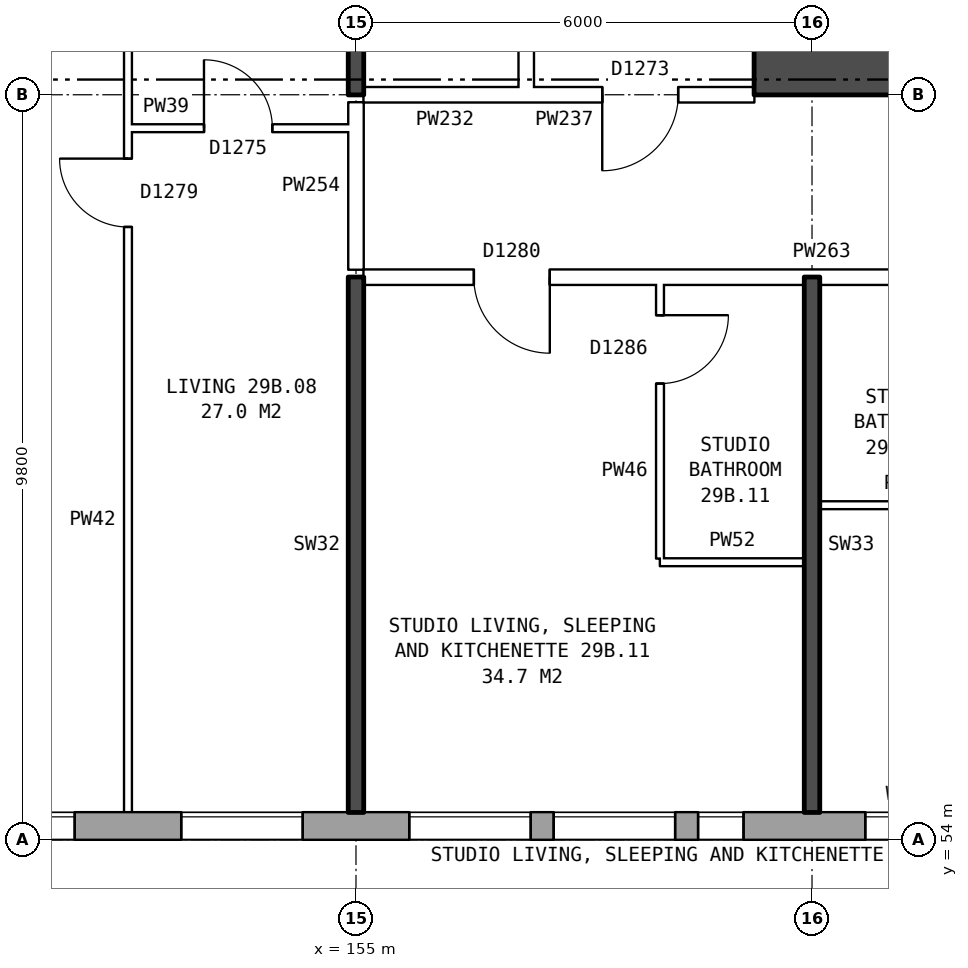
"""IFC4 building model, lengths in metres.
Left out: names, types, materials, properties, quantities, classifications, styles, units other than length and angle.
Written with IfcOpenShell. Run it as: python <this file> out.ifc"""

import sys

from ifc_helpers import new_model, si_unit, direction, frame, frame_2d, origin, place, context, subcontext, project, spatial, rectangle, extrude, element, fill, save


model = new_model("IFC4")
c1 = context("Model", 3, precision=1e-05, world=origin(), true_north=direction((0.0, 1.0)))
c2 = subcontext(c1, "Body", "Model", "MODEL_VIEW")
j1 = project(units=[si_unit("LENGTHUNIT", "METRE"), si_unit("PLANEANGLEUNIT", "RADIAN")], contexts=[c1])
p1 = place(None, origin())
s1 = spatial("IfcSite", under=j1, at=p1, CompositionType="ELEMENT")
p2 = place(p1, origin())
s2 = spatial("IfcBuilding", under=s1, at=p2, CompositionType="ELEMENT")
p3 = place(p2, frame((0.0, 0.0, 105.7)))
s3 = spatial("IfcBuildingStorey", under=s2, at=p3, CompositionType="ELEMENT", Elevation=105.7)
p4 = place(p3, frame((134.075, 54.18, 0.0), z_axis=(0.0, 0.0, 1.0), x_axis=(1.0, 0.0, 0.0)))
e1 = element("IfcWall", 1, at=p4, inside=s3, PredefinedType="STANDARD", context=c2, shape_type="SweptSolid", body=[
    extrude(rectangle(XDim=36.851, YDim=0.36, at=frame_2d((18.425, 0.0))), origin(), (0.0, 0.0, 1.0), 2.85),
])
p5 = place(p4, frame((0.625, 0.0, 0.8)))
e2 = element("IfcOpeningElement", 2, at=p5, cuts=e1, PredefinedType="OPENING", context=c2, shape_type="SweptSolid", body=[
    extrude(rectangle(XDim=1.6, YDim=1.8, at=frame_2d((0.8, 0.9))), frame((0.0, 0.19, 0.0), z_axis=(0.0, -1.0, 0.0), x_axis=(1.0, 0.0, 0.0)), (0.0, 0.0, 1.0), 0.38),
])
p6 = place(p4, frame((3.625, 0.0, 0.8)))
e3 = element("IfcOpeningElement", 3, at=p6, cuts=e1, PredefinedType="OPENING", context=c2, shape_type="SweptSolid", body=[
    extrude(rectangle(XDim=1.6, YDim=1.8, at=frame_2d((0.8, 0.9))), frame((0.0, 0.19, 0.0), z_axis=(0.0, -1.0, 0.0), x_axis=(1.0, 0.0, 0.0)), (0.0, 0.0, 1.0), 0.38),
])
p7 = place(p4, frame((6.625, 0.0, 0.8)))
e4 = element("IfcOpeningElement", 4, at=p7, cuts=e1, PredefinedType="OPENING", context=c2, shape_type="SweptSolid", body=[
    extrude(rectangle(XDim=1.6, YDim=1.8, at=frame_2d((0.8, 0.9))), frame((0.0, 0.19, 0.0), z_axis=(0.0, -1.0, 0.0), x_axis=(1.0, 0.0, 0.0)), (0.0, 0.0, 1.0), 0.38),
])
p8 = place(p4, frame((9.925, 0.0, 0.15)))
e5 = element("IfcOpeningElement", 5, at=p8, cuts=e1, PredefinedType="OPENING", context=c2, shape_type="SweptSolid", body=[
    extrude(rectangle(XDim=0.6, YDim=0.9, at=frame_2d((0.3, 0.45))), frame((0.0, 0.19, 0.0), z_axis=(0.0, -1.0, 0.0), x_axis=(1.0, 0.0, 0.0)), (0.0, 0.0, 1.0), 0.38),
])
p9 = place(p4, frame((12.625, 0.0, 0.8)))
e6 = element("IfcOpeningElement", 6, at=p9, cuts=e1, PredefinedType="OPENING", context=c2, shape_type="SweptSolid", body=[
    extrude(rectangle(XDim=1.6, YDim=1.8, at=frame_2d((0.8, 0.9))), frame((0.0, 0.19, 0.0), z_axis=(0.0, -1.0, 0.0), x_axis=(1.0, 0.0, 0.0)), (0.0, 0.0, 1.0), 0.38),
])
p10 = place(p4, frame((15.625, 0.0, 0.8)))
e7 = element("IfcOpeningElement", 7, at=p10, cuts=e1, PredefinedType="OPENING", context=c2, shape_type="SweptSolid", body=[
    extrude(rectangle(XDim=1.6, YDim=1.8, at=frame_2d((0.8, 0.9))), frame((0.0, 0.19, 0.0), z_axis=(0.0, -1.0, 0.0), x_axis=(1.0, 0.0, 0.0)), (0.0, 0.0, 1.0), 0.38),
])
p11 = place(p4, frame((18.625, 0.0, 0.8)))
e8 = element("IfcOpeningElement", 8, at=p11, cuts=e1, PredefinedType="OPENING", context=c2, shape_type="SweptSolid", body=[
    extrude(rectangle(XDim=1.6, YDim=1.8, at=frame_2d((0.8, 0.9))), frame((0.0, 0.19, 0.0), z_axis=(0.0, -1.0, 0.0), x_axis=(1.0, 0.0, 0.0)), (0.0, 0.0, 1.0), 0.38),
])
p12 = place(p4, frame((21.625, 0.0, 0.8)))
e9 = element("IfcOpeningElement", 9, at=p12, cuts=e1, PredefinedType="OPENING", context=c2, shape_type="SweptSolid", body=[
    extrude(rectangle(XDim=1.6, YDim=1.8, at=frame_2d((0.8, 0.9))), frame((0.0, 0.19, 0.0), z_axis=(0.0, -1.0, 0.0), x_axis=(1.0, 0.0, 0.0)), (0.0, 0.0, 1.0), 0.38),
])
p13 = place(p4, frame((23.525, 0.0, 0.8)))
e10 = element("IfcOpeningElement", 10, at=p13, cuts=e1, PredefinedType="OPENING", context=c2, shape_type="SweptSolid", body=[
    extrude(rectangle(XDim=1.6, YDim=1.8, at=frame_2d((0.8, 0.9))), frame((0.0, 0.19, 0.0), z_axis=(0.0, -1.0, 0.0), x_axis=(1.0, 0.0, 0.0)), (0.0, 0.0, 1.0), 0.38),
])
p14 = place(p4, frame((27.625, 0.0, 1.4)))
e11 = element("IfcOpeningElement", 11, at=p14, cuts=e1, PredefinedType="OPENING", context=c2, shape_type="SweptSolid", body=[
    extrude(rectangle(XDim=1.0, YDim=1.2, at=frame_2d((0.5, 0.6))), frame((0.0, 0.19, 0.0), z_axis=(0.0, -1.0, 0.0), x_axis=(1.0, 0.0, 0.0)), (0.0, 0.0, 1.0), 0.38),
])
p15 = place(p4, frame((30.625, 0.0, 0.8)))
e12 = element("IfcOpeningElement", 12, at=p15, cuts=e1, PredefinedType="OPENING", context=c2, shape_type="SweptSolid", body=[
    extrude(rectangle(XDim=1.6, YDim=1.8, at=frame_2d((0.8, 0.9))), frame((0.0, 0.19, 0.0), z_axis=(0.0, -1.0, 0.0), x_axis=(1.0, 0.0, 0.0)), (0.0, 0.0, 1.0), 0.38),
])
p16 = place(p4, frame((33.625, 0.0, 0.8)))
e13 = element("IfcOpeningElement", 13, at=p16, cuts=e1, PredefinedType="OPENING", context=c2, shape_type="SweptSolid", body=[
    extrude(rectangle(XDim=1.6, YDim=1.8, at=frame_2d((0.8, 0.9))), frame((0.0, 0.19, 0.0), z_axis=(0.0, -1.0, 0.0), x_axis=(1.0, 0.0, 0.0)), (0.0, 0.0, 1.0), 0.38),
])
p17 = place(p4, frame((10.975, 0.0, 0.15)))
e14 = element("IfcOpeningElement", 14, at=p17, cuts=e1, PredefinedType="OPENING", context=c2, shape_type="SweptSolid", body=[
    extrude(rectangle(XDim=0.8, YDim=1.8, at=frame_2d((0.4, 0.9))), frame((0.0, 0.19, 0.0), z_axis=(0.0, -1.0, 0.0), x_axis=(1.0, 0.0, 0.0)), (0.0, 0.0, 1.0), 0.38),
])
p18 = place(p4, frame((25.425, 0.0, 0.8)))
e15 = element("IfcOpeningElement", 15, at=p18, cuts=e1, PredefinedType="OPENING", context=c2, shape_type="SweptSolid", body=[
    extrude(rectangle(XDim=0.6, YDim=0.9, at=frame_2d((0.3, 0.45))), frame((0.0, 0.19, 0.0), z_axis=(0.0, -1.0, 0.0), x_axis=(1.0, 0.0, 0.0)), (0.0, 0.0, 1.0), 0.38),
])
p19 = place(p4, frame((28.925, 0.0, 0.8)))
e16 = element("IfcOpeningElement", 16, at=p19, cuts=e1, PredefinedType="OPENING", context=c2, shape_type="SweptSolid", body=[
    extrude(rectangle(XDim=1.4, YDim=1.8, at=frame_2d((0.7, 0.9))), frame((0.0, 0.19, 0.0), z_axis=(0.0, -1.0, 0.0), x_axis=(1.0, 0.0, 0.0)), (0.0, 0.0, 1.0), 0.38),
])
p20 = place(p3, frame((160.24, 64.125, 0.0), z_axis=(0.0, 0.0, 1.0), x_axis=(1.0, 0.0, 0.0)))
e17 = element("IfcWall", 17, at=p20, inside=s3, PredefinedType="SHEAR", context=c2, shape_type="SweptSolid", body=[
    extrude(rectangle(XDim=8.4, YDim=0.65, at=frame_2d((4.2, 0.0))), origin(), (0.0, 0.0, 1.0), 2.85),
])
p21 = place(p3, frame((157.24, 63.9, 0.0), z_axis=(0.0, 0.0, 1.0), x_axis=(0.0, 1.0, 0.0)))
e18 = element("IfcWall", 18, at=p21, inside=s3, PredefinedType="PARTITIONING", context=c2, shape_type="SweptSolid", body=[
    extrude(rectangle(XDim=12.2, YDim=0.2, at=frame_2d((6.1, 0.0))), origin(), (0.0, 0.0, 1.0), 2.85),
])
p22 = place(p21, frame((5.1, 0.0, 0.0)))
e19 = element("IfcOpeningElement", 19, at=p22, cuts=e18, PredefinedType="OPENING", context=c2, shape_type="SweptSolid", body=[
    extrude(rectangle(XDim=2.0, YDim=2.1, at=frame_2d((1.0, 1.05))), frame((0.0, 0.11, 0.0), z_axis=(0.0, -1.0, 0.0), x_axis=(1.0, 0.0, 0.0)), (0.0, 0.0, 1.0), 0.22),
])
p23 = place(p3, frame((159.0, 57.65, 0.0), z_axis=(0.0, 0.0, 1.0), x_axis=(1.0, 0.0, 0.0)))
e20 = element("IfcWall", 20, at=p23, inside=s3, PredefinedType="PARTITIONING", context=c2, shape_type="SweptSolid", body=[
    extrude(rectangle(XDim=1.9, YDim=0.1, at=frame_2d((0.95, 0.0))), origin(), (0.0, 0.0, 1.0), 2.85),
])
p24 = place(p3, frame((161.1, 58.4, 0.0), z_axis=(0.0, 0.0, 1.0), x_axis=(1.0, 0.0, 0.0)))
e21 = element("IfcWall", 21, at=p24, inside=s3, PredefinedType="PARTITIONING", context=c2, shape_type="SweptSolid", body=[
    extrude(rectangle(XDim=2.3, YDim=0.1, at=frame_2d((1.15, 0.0))), origin(), (0.0, 0.0, 1.0), 2.85),
])
p25 = place(p3, frame((155.1, 61.4, 0.0), z_axis=(0.0, 0.0, 1.0), x_axis=(1.0, 0.0, 0.0)))
e22 = element("IfcWall", 22, at=p25, inside=s3, PredefinedType="PARTITIONING", context=c2, shape_type="SweptSolid", body=[
    extrude(rectangle(XDim=18.54, YDim=0.2, at=frame_2d((9.27, 0.0))), origin(), (0.0, 0.0, 1.0), 2.85),
])
p26 = place(p25, frame((1.45, 0.0, 0.0)))
e23 = element("IfcOpeningElement", 23, at=p26, cuts=e22, PredefinedType="OPENING", context=c2, shape_type="SweptSolid", body=[
    extrude(rectangle(XDim=1.0, YDim=2.1, at=frame_2d((0.5, 1.05))), frame((0.0, 0.11, 0.0), z_axis=(0.0, -1.0, 0.0), x_axis=(1.0, 0.0, 0.0)), (0.0, 0.0, 1.0), 0.22),
])
p27 = place(p25, frame((9.6, 0.0, 0.0)))
e24 = element("IfcOpeningElement", 24, at=p27, cuts=e22, PredefinedType="OPENING", context=c2, shape_type="SweptSolid", body=[
    extrude(rectangle(XDim=1.0, YDim=2.1, at=frame_2d((0.5, 1.05))), frame((0.0, 0.11, 0.0), z_axis=(0.0, -1.0, 0.0), x_axis=(1.0, 0.0, 0.0)), (0.0, 0.0, 1.0), 0.22),
])
p28 = place(p25, frame((13.4, 0.0, 0.0)))
e25 = element("IfcOpeningElement", 25, at=p28, cuts=e22, PredefinedType="OPENING", context=c2, shape_type="SweptSolid", body=[
    extrude(rectangle(XDim=1.0, YDim=2.1, at=frame_2d((0.5, 1.05))), frame((0.0, 0.11, 0.0), z_axis=(0.0, -1.0, 0.0), x_axis=(1.0, 0.0, 0.0)), (0.0, 0.0, 1.0), 0.22),
])
p29 = place(p3, frame((152.0, 63.36, 0.0), z_axis=(0.0, 0.0, 1.0), x_axis=(1.0, 0.0, 0.0)))
e26 = element("IfcWall", 26, at=p29, inside=s3, PredefinedType="PARTITIONING", context=c2, shape_type="SweptSolid", body=[
    extrude(rectangle(XDim=2.9, YDim=0.1, at=frame_2d((1.45, 0.0))), origin(), (0.0, 0.0, 1.0), 2.85),
])
p30 = place(p29, frame((1.0, 0.0, 0.0)))
e27 = element("IfcOpeningElement", 27, at=p30, cuts=e26, PredefinedType="OPENING", context=c2, shape_type="SweptSolid", body=[
    extrude(rectangle(XDim=0.9, YDim=2.1, at=frame_2d((0.45, 1.05))), frame((0.0, 0.06, 0.0), z_axis=(0.0, -1.0, 0.0), x_axis=(1.0, 0.0, 0.0)), (0.0, 0.0, 1.0), 0.12),
])
p31 = place(p3, frame((155.1, 63.8, 0.0), z_axis=(0.0, 0.0, 1.0), x_axis=(1.0, 0.0, 0.0)))
e28 = element("IfcWall", 28, at=p31, inside=s3, PredefinedType="PARTITIONING", context=c2, shape_type="SweptSolid", body=[
    extrude(rectangle(XDim=2.14, YDim=0.2, at=frame_2d((1.07, 0.0))), origin(), (0.0, 0.0, 1.0), 2.85),
])
p32 = place(p3, frame((157.24, 63.8, 0.0), z_axis=(0.0, 0.0, 1.0), x_axis=(1.0, 0.0, 0.0)))
e29 = element("IfcWall", 29, at=p32, inside=s3, PredefinedType="PARTITIONING", context=c2, shape_type="SweptSolid", body=[
    extrude(rectangle(XDim=3.0, YDim=0.2, at=frame_2d((1.5, 0.0))), origin(), (0.0, 0.0, 1.0), 2.85),
])
p33 = place(p32, frame((1.0, 0.0, 0.0)))
e30 = element("IfcOpeningElement", 30, at=p33, cuts=e29, PredefinedType="OPENING", context=c2, shape_type="SweptSolid", body=[
    extrude(rectangle(XDim=1.0, YDim=2.1, at=frame_2d((0.5, 1.05))), frame((0.0, 0.11, 0.0), z_axis=(0.0, -1.0, 0.0), x_axis=(1.0, 0.0, 0.0)), (0.0, 0.0, 1.0), 0.22),
])
p34 = place(p3, frame((152.0, 54.36, 0.0), z_axis=(0.0, 0.0, 1.0), x_axis=(0.0, 1.0, 0.0)))
e31 = element("IfcWall", 31, at=p34, inside=s3, PredefinedType="PARTITIONING", context=c2, shape_type="SweptSolid", body=[
    extrude(rectangle(XDim=14.34, YDim=0.1, at=frame_2d((7.17, 0.0))), origin(), (0.0, 0.0, 1.0), 2.85),
])
p35 = place(p34, frame((7.7, 0.0, 0.0)))
e32 = element("IfcOpeningElement", 32, at=p35, cuts=e31, PredefinedType="OPENING", context=c2, shape_type="SweptSolid", body=[
    extrude(rectangle(XDim=0.9, YDim=2.1, at=frame_2d((0.45, 1.05))), frame((0.0, 0.06, 0.0), z_axis=(0.0, -1.0, 0.0), x_axis=(1.0, 0.0, 0.0)), (0.0, 0.0, 1.0), 0.12),
])
p36 = place(p34, frame((13.04, 0.0, 0.0)))
e33 = element("IfcOpeningElement", 33, at=p36, cuts=e31, PredefinedType="OPENING", context=c2, shape_type="SweptSolid", body=[
    extrude(rectangle(XDim=0.9, YDim=2.1, at=frame_2d((0.45, 1.05))), frame((0.0, 0.06, 0.0), z_axis=(0.0, -1.0, 0.0), x_axis=(1.0, 0.0, 0.0)), (0.0, 0.0, 1.0), 0.12),
])
p37 = place(p3, frame((155.0, 54.36, 0.0), z_axis=(0.0, 0.0, 1.0), x_axis=(0.0, 1.0, 0.0)))
e34 = element("IfcWall", 34, at=p37, inside=s3, PredefinedType="SOLIDWALL", context=c2, shape_type="SweptSolid", body=[
    extrude(rectangle(XDim=7.04, YDim=0.2, at=frame_2d((3.52, 0.0))), origin(), (0.0, 0.0, 1.0), 2.85),
])
p38 = place(p3, frame((155.0, 61.5, 0.0), z_axis=(0.0, 0.0, 1.0), x_axis=(0.0, 1.0, 0.0)))
e35 = element("IfcWall", 35, at=p38, inside=s3, PredefinedType="PARTITIONING", context=c2, shape_type="SweptSolid", body=[
    extrude(rectangle(XDim=2.2, YDim=0.2, at=frame_2d((1.1, 0.0))), origin(), (0.0, 0.0, 1.0), 2.85),
])
p39 = place(p3, frame((155.0, 63.8, 0.0), z_axis=(0.0, 0.0, 1.0), x_axis=(0.0, 1.0, 0.0)))
e36 = element("IfcWall", 36, at=p39, inside=s3, PredefinedType="SOLIDWALL", context=c2, shape_type="SweptSolid", body=[
    extrude(rectangle(XDim=5.0, YDim=0.2, at=frame_2d((2.5, 0.0))), origin(), (0.0, 0.0, 1.0), 2.85),
])
p40 = place(p3, frame((159.0, 57.7, 0.0), z_axis=(0.0, 0.0, 1.0), x_axis=(0.0, 1.0, 0.0)))
e37 = element("IfcWall", 37, at=p40, inside=s3, PredefinedType="PARTITIONING", context=c2, shape_type="SweptSolid", body=[
    extrude(rectangle(XDim=3.6, YDim=0.1, at=frame_2d((1.8, 0.0))), origin(), (0.0, 0.0, 1.0), 2.85),
])
p41 = place(p40, frame((2.3, 0.0, 0.0)))
e38 = element("IfcOpeningElement", 38, at=p41, cuts=e37, PredefinedType="OPENING", context=c2, shape_type="SweptSolid", body=[
    extrude(rectangle(XDim=0.9, YDim=2.1, at=frame_2d((0.45, 1.05))), frame((0.0, 0.06, 0.0), z_axis=(0.0, -1.0, 0.0), x_axis=(1.0, 0.0, 0.0)), (0.0, 0.0, 1.0), 0.12),
])
p42 = place(p3, frame((161.0, 54.36, 0.0), z_axis=(0.0, 0.0, 1.0), x_axis=(0.0, 1.0, 0.0)))
e39 = element("IfcWall", 39, at=p42, inside=s3, PredefinedType="SOLIDWALL", context=c2, shape_type="SweptSolid", body=[
    extrude(rectangle(XDim=7.04, YDim=0.2, at=frame_2d((3.52, 0.0))), origin(), (0.0, 0.0, 1.0), 2.85),
])
p43 = place(p10, origin())
e40 = element("IfcWindow", 40, at=p43, inside=s3, PartitioningType="SINGLE_PANEL", PredefinedType="WINDOW", context=c2, shape_type="SweptSolid", body=[
    extrude(rectangle(XDim=1.6, YDim=1.8, at=frame_2d((0.8, 0.9))), frame((0.0, 0.15, 0.0), z_axis=(0.0, -1.0, 0.0), x_axis=(1.0, 0.0, 0.0)), (0.0, 0.0, 1.0), 0.06),
])
fill(e7, e40)
p44 = place(p11, origin())
e41 = element("IfcWindow", 41, at=p44, inside=s3, PartitioningType="SINGLE_PANEL", PredefinedType="WINDOW", context=c2, shape_type="SweptSolid", body=[
    extrude(rectangle(XDim=1.6, YDim=1.8, at=frame_2d((0.8, 0.9))), frame((0.0, 0.15, 0.0), z_axis=(0.0, -1.0, 0.0), x_axis=(1.0, 0.0, 0.0)), (0.0, 0.0, 1.0), 0.06),
])
fill(e8, e41)
p45 = place(p12, origin())
e42 = element("IfcWindow", 42, at=p45, inside=s3, PartitioningType="SINGLE_PANEL", PredefinedType="WINDOW", context=c2, shape_type="SweptSolid", body=[
    extrude(rectangle(XDim=1.6, YDim=1.8, at=frame_2d((0.8, 0.9))), frame((0.0, 0.15, 0.0), z_axis=(0.0, -1.0, 0.0), x_axis=(1.0, 0.0, 0.0)), (0.0, 0.0, 1.0), 0.06),
])
fill(e9, e42)
p46 = place(p13, origin())
e43 = element("IfcWindow", 43, at=p46, inside=s3, PartitioningType="SINGLE_PANEL", PredefinedType="WINDOW", context=c2, shape_type="SweptSolid", body=[
    extrude(rectangle(XDim=1.6, YDim=1.8, at=frame_2d((0.8, 0.9))), frame((0.0, 0.15, 0.0), z_axis=(0.0, -1.0, 0.0), x_axis=(1.0, 0.0, 0.0)), (0.0, 0.0, 1.0), 0.06),
])
fill(e10, e43)
p47 = place(p14, origin())
e44 = element("IfcWindow", 44, at=p47, inside=s3, PartitioningType="SINGLE_PANEL", PredefinedType="WINDOW", context=c2, shape_type="SweptSolid", body=[
    extrude(rectangle(XDim=1.0, YDim=1.2, at=frame_2d((0.5, 0.6))), frame((0.0, 0.15, 0.0), z_axis=(0.0, -1.0, 0.0), x_axis=(1.0, 0.0, 0.0)), (0.0, 0.0, 1.0), 0.06),
])
fill(e11, e44)
p48 = place(p33, frame((1.0, 0.0, 0.0), z_axis=(0.0, 0.0, 1.0), x_axis=(-1.0, 0.0, 0.0)))
e45 = element("IfcDoor", 45, at=p48, inside=s3, OperationType="SINGLE_SWING_RIGHT", PredefinedType="DOOR", context=c2, shape_type="SweptSolid", body=[
    extrude(rectangle(XDim=1.0, YDim=2.1, at=frame_2d((0.5, 1.05))), frame((0.0, 0.025, 0.0), z_axis=(0.0, -1.0, 0.0), x_axis=(1.0, 0.0, 0.0)), (0.0, 0.0, 1.0), 0.05),
])
fill(e30, e45)
p49 = place(p35, origin())
e46 = element("IfcDoor", 46, at=p49, inside=s3, OperationType="SINGLE_SWING_RIGHT", PredefinedType="DOOR", context=c2, shape_type="SweptSolid", body=[
    extrude(rectangle(XDim=0.9, YDim=2.1, at=frame_2d((0.45, 1.05))), frame((0.0, 0.025, 0.0), z_axis=(0.0, -1.0, 0.0), x_axis=(1.0, 0.0, 0.0)), (0.0, 0.0, 1.0), 0.05),
])
fill(e32, e46)
p50 = place(p30, origin())
e47 = element("IfcDoor", 47, at=p50, inside=s3, OperationType="SINGLE_SWING_LEFT", PredefinedType="DOOR", context=c2, shape_type="SweptSolid", body=[
    extrude(rectangle(XDim=0.9, YDim=2.1, at=frame_2d((0.45, 1.05))), frame((0.0, 0.025, 0.0), z_axis=(0.0, -1.0, 0.0), x_axis=(1.0, 0.0, 0.0)), (0.0, 0.0, 1.0), 0.05),
])
fill(e27, e47)
p51 = place(p26, frame((1.0, 0.0, 0.0), z_axis=(0.0, 0.0, 1.0), x_axis=(-1.0, 0.0, 0.0)))
e48 = element("IfcDoor", 48, at=p51, inside=s3, OperationType="SINGLE_SWING_LEFT", PredefinedType="DOOR", context=c2, shape_type="SweptSolid", body=[
    extrude(rectangle(XDim=1.0, YDim=2.1, at=frame_2d((0.5, 1.05))), frame((0.0, 0.025, 0.0), z_axis=(0.0, -1.0, 0.0), x_axis=(1.0, 0.0, 0.0)), (0.0, 0.0, 1.0), 0.05),
])
fill(e23, e48)
p52 = place(p41, frame((0.9, 0.0, 0.0), z_axis=(0.0, 0.0, 1.0), x_axis=(-1.0, 0.0, 0.0)))
e49 = element("IfcDoor", 49, at=p52, inside=s3, OperationType="SINGLE_SWING_LEFT", PredefinedType="DOOR", context=c2, shape_type="SweptSolid", body=[
    extrude(rectangle(XDim=0.9, YDim=2.1, at=frame_2d((0.45, 1.05))), frame((0.0, 0.025, 0.0), z_axis=(0.0, -1.0, 0.0), x_axis=(1.0, 0.0, 0.0)), (0.0, 0.0, 1.0), 0.05),
])
fill(e38, e49)
p53 = place(p18, origin())
e50 = element("IfcWindow", 50, at=p53, inside=s3, PartitioningType="SINGLE_PANEL", PredefinedType="WINDOW", context=c2, shape_type="SweptSolid", body=[
    extrude(rectangle(XDim=0.6, YDim=0.9, at=frame_2d((0.3, 0.45))), frame((0.0, 0.15, 0.0), z_axis=(0.0, -1.0, 0.0), x_axis=(1.0, 0.0, 0.0)), (0.0, 0.0, 1.0), 0.06),
])
fill(e15, e50)
save(model, sys.argv[1])
